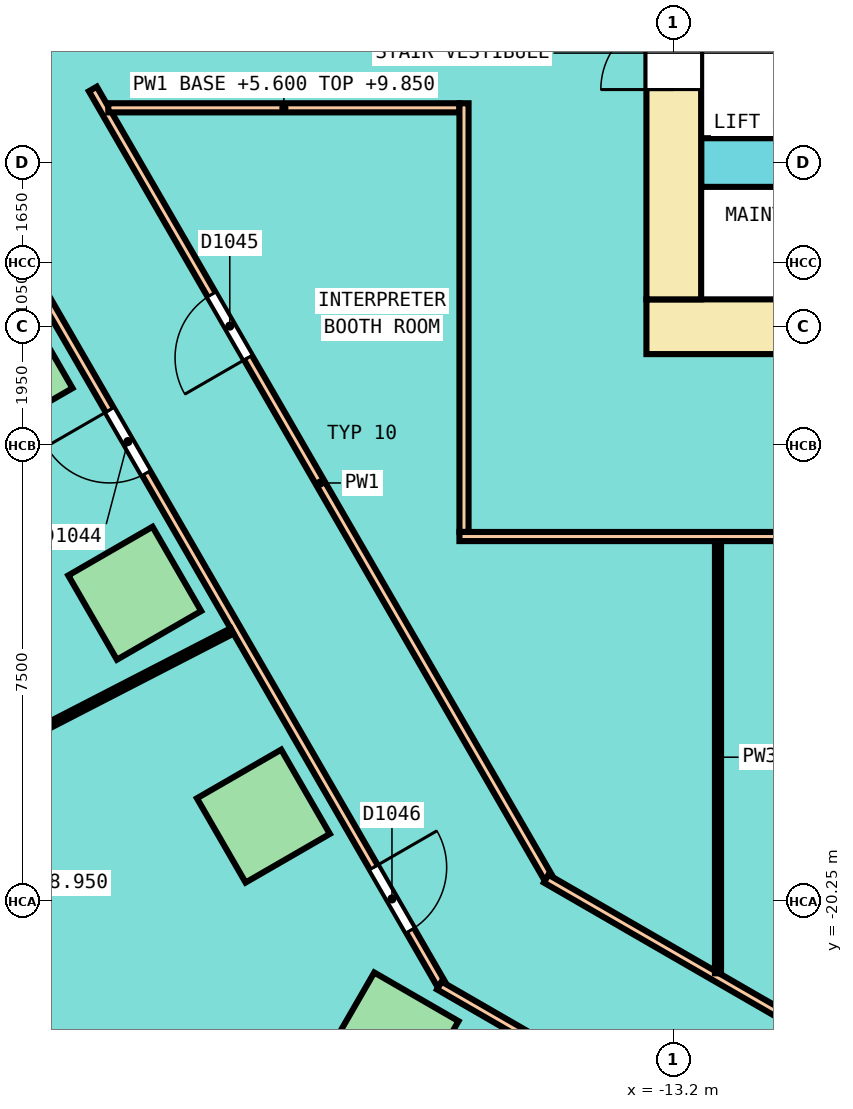
"""IFC4 building model, lengths in metres.
Left out: names, types, materials, properties, quantities, classifications, styles, units other than length and angle.
Written with IfcOpenShell. Run it as: python <this file> out.ifc"""

import sys

from ifc_helpers import new_model, si_unit, direction, frame, frame_2d, origin, origin_2d, place, context, subcontext, project, spatial, rectangle, extrude, element, fill, save


model = new_model("IFC4")
c1 = context("Model", 3, precision=1e-05, world=origin(), true_north=direction((0.0, 1.0)))
c2 = subcontext(c1, "Body", "Model", "MODEL_VIEW")
j1 = project(units=[si_unit("LENGTHUNIT", "METRE"), si_unit("PLANEANGLEUNIT", "RADIAN")], contexts=[c1])
p1 = place(None, origin())
s1 = spatial("IfcSite", under=j1, at=p1, CompositionType="ELEMENT")
p2 = place(p1, origin())
s2 = spatial("IfcBuilding", under=s1, at=p2, CompositionType="ELEMENT")
p3 = place(p2, frame((0.0, 0.0, 5.6)))
s3 = spatial("IfcBuildingStorey", under=s2, at=p3, CompositionType="ELEMENT", Elevation=5.6)
for number, where, z_axis, x_axis in (
    (1, (-24.181, -11.518, 0.0), (0.0, 0.0, 1.0), (0.5, -0.866, 0.0)),
    (2, (-22.065, -15.183, 0.0), (0.0, 0.0, 1.0), (0.5, -0.866, 0.0)),
    (3, (-19.949, -18.847, 0.0), (0.0, 0.0, 1.0), (0.5, -0.866, 0.0)),
    (4, (-17.833, -22.512, 0.0), (0.0, 0.0, 1.0), (0.866, -0.5, 0.0)),
):
    element("IfcColumn", number, at=place(p3, frame(where, z_axis=z_axis, x_axis=x_axis)), inside=s3, PredefinedType="COLUMN", context=c2, shape_type="SweptSolid", body=[
        extrude(rectangle(XDim=1.6, YDim=1.6, at=origin_2d()), origin(), (0.0, 0.0, 1.0), 4.25),
    ])
p4 = place(p3, frame((-13.65, -10.8, 0.0), z_axis=(0.0, 0.0, 1.0), x_axis=(1.0, 0.0, 0.0)))
e5 = element("IfcWall", 5, at=p4, inside=s3, PredefinedType="SHEAR", context=c2, shape_type="SweptSolid", body=[
    extrude(rectangle(XDim=27.3, YDim=0.9, at=frame_2d((13.65, 0.0))), origin(), (0.0, 0.0, 1.0), 4.3),
])
p5 = place(p4, frame((2.425, 0.0, 0.0)))
e6 = element("IfcOpeningElement", 6, at=p5, cuts=e5, PredefinedType="OPENING", context=c2, shape_type="SweptSolid", body=[
    extrude(rectangle(XDim=1.0, YDim=2.1, at=frame_2d((0.5, 1.05))), frame((0.0, 0.46, 0.0), z_axis=(0.0, -1.0, 0.0), x_axis=(1.0, 0.0, 0.0)), (0.0, 0.0, 1.0), 0.92),
])
p6 = place(p4, frame((6.569, 0.0, 0.0)))
e7 = element("IfcOpeningElement", 7, at=p6, cuts=e5, PredefinedType="OPENING", context=c2, shape_type="SweptSolid", body=[
    extrude(rectangle(XDim=1.0, YDim=2.1, at=frame_2d((0.5, 1.05))), frame((0.0, 0.46, 0.0), z_axis=(0.0, -1.0, 0.0), x_axis=(1.0, 0.0, 0.0)), (0.0, 0.0, 1.0), 0.92),
])
p7 = place(p4, frame((10.681, 0.0, 0.0)))
e8 = element("IfcOpeningElement", 8, at=p7, cuts=e5, PredefinedType="OPENING", context=c2, shape_type="SweptSolid", body=[
    extrude(rectangle(XDim=1.0, YDim=2.1, at=frame_2d((0.5, 1.05))), frame((0.0, 0.46, 0.0), z_axis=(0.0, -1.0, 0.0), x_axis=(1.0, 0.0, 0.0)), (0.0, 0.0, 1.0), 0.92),
])
p8 = place(p4, frame((19.202, 0.0, 0.0)))
e9 = element("IfcOpeningElement", 9, at=p8, cuts=e5, PredefinedType="OPENING", context=c2, shape_type="SweptSolid", body=[
    extrude(rectangle(XDim=1.0, YDim=2.1, at=frame_2d((0.5, 1.05))), frame((0.0, 0.46, 0.0), z_axis=(0.0, -1.0, 0.0), x_axis=(1.0, 0.0, 0.0)), (0.0, 0.0, 1.0), 0.92),
])
p9 = place(p4, frame((21.881, 0.0, 0.0)))
e10 = element("IfcOpeningElement", 10, at=p9, cuts=e5, PredefinedType="OPENING", context=c2, shape_type="SweptSolid", body=[
    extrude(rectangle(XDim=1.0, YDim=2.1, at=frame_2d((0.5, 1.05))), frame((0.0, 0.46, 0.0), z_axis=(0.0, -1.0, 0.0), x_axis=(1.0, 0.0, 0.0)), (0.0, 0.0, 1.0), 0.92),
])
p10 = place(p4, frame((24.592, 0.0, 0.0)))
e11 = element("IfcOpeningElement", 11, at=p10, cuts=e5, PredefinedType="OPENING", context=c2, shape_type="SweptSolid", body=[
    extrude(rectangle(XDim=1.0, YDim=2.1, at=frame_2d((0.5, 1.05))), frame((0.0, 0.46, 0.0), z_axis=(0.0, -1.0, 0.0), x_axis=(1.0, 0.0, 0.0)), (0.0, 0.0, 1.0), 0.92),
])
p11 = place(p4, frame((15.2, 0.0, 0.0)))
e12 = element("IfcOpeningElement", 12, at=p11, cuts=e5, PredefinedType="OPENING", context=c2, shape_type="SweptSolid", body=[
    extrude(rectangle(XDim=1.2, YDim=2.1, at=frame_2d((0.6, 1.05))), frame((0.0, 0.46, 0.0), z_axis=(0.0, -1.0, 0.0), x_axis=(1.0, 0.0, 0.0)), (0.0, 0.0, 1.0), 0.92),
])
p12 = place(p3, frame((-13.2, -10.35, 0.0), z_axis=(0.0, 0.0, 1.0), x_axis=(0.0, 1.0, 0.0)))
e13 = element("IfcWall", 13, at=p12, inside=s3, PredefinedType="SHEAR", context=c2, shape_type="SweptSolid", body=[
    extrude(rectangle(XDim=20.7, YDim=0.9, at=frame_2d((10.35, 0.0))), origin(), (0.0, 0.0, 1.0), 4.3),
])
p13 = place(p12, frame((9.15, 0.0, 0.0)))
e14 = element("IfcOpeningElement", 14, at=p13, cuts=e13, PredefinedType="OPENING", context=c2, shape_type="SweptSolid", body=[
    extrude(rectangle(XDim=2.4, YDim=2.1, at=frame_2d((1.2, 1.05))), frame((0.0, 0.46, 0.0), z_axis=(0.0, -1.0, 0.0), x_axis=(1.0, 0.0, 0.0)), (0.0, 0.0, 1.0), 0.92),
])
p14 = place(p12, frame((16.05, 0.0, 0.0)))
e15 = element("IfcOpeningElement", 15, at=p14, cuts=e13, PredefinedType="OPENING", context=c2, shape_type="SweptSolid", body=[
    extrude(rectangle(XDim=1.2, YDim=2.1, at=frame_2d((0.6, 1.05))), frame((0.0, 0.46, 0.0), z_axis=(0.0, -1.0, 0.0), x_axis=(1.0, 0.0, 0.0)), (0.0, 0.0, 1.0), 0.92),
])
p15 = place(p12, frame((3.45, 0.0, 0.0)))
e16 = element("IfcOpeningElement", 16, at=p15, cuts=e13, PredefinedType="OPENING", context=c2, shape_type="SweptSolid", body=[
    extrude(rectangle(XDim=1.2, YDim=2.1, at=frame_2d((0.6, 1.05))), frame((0.0, 0.46, 0.0), z_axis=(0.0, -1.0, 0.0), x_axis=(1.0, 0.0, 0.0)), (0.0, 0.0, 1.0), 0.92),
])
p16 = place(p3, frame((-12.75, -8.1, 0.0), z_axis=(0.0, 0.0, 1.0), x_axis=(1.0, 0.0, 0.0)))
e17 = element("IfcWall", 17, at=p16, inside=s3, PredefinedType="SHEAR", context=c2, shape_type="SweptSolid", body=[
    extrude(rectangle(XDim=25.5, YDim=0.8, at=frame_2d((12.75, 0.0))), origin(), (0.0, 0.0, 1.0), 4.3),
])
p17 = place(p16, frame((14.3, 0.0, 0.0)))
e18 = element("IfcOpeningElement", 18, at=p17, cuts=e17, PredefinedType="OPENING", context=c2, shape_type="SweptSolid", body=[
    extrude(rectangle(XDim=1.2, YDim=2.1, at=frame_2d((0.6, 1.05))), frame((0.0, 0.41, 0.0), z_axis=(0.0, -1.0, 0.0), x_axis=(1.0, 0.0, 0.0)), (0.0, 0.0, 1.0), 0.82),
])
p18 = place(p3, frame((-22.753, -6.89, 0.0), z_axis=(0.0, 0.0, 1.0), x_axis=(0.499997859304, -0.866026639712, 0.0)))
e19 = element("IfcWall", 19, at=p18, inside=s3, PredefinedType="PARTITIONING", context=c2, shape_type="SweptSolid", body=[
    extrude(rectangle(XDim=14.963, YDim=0.15, at=frame_2d((7.482, 0.0))), origin(), (0.0, 0.0, 1.0), 3.2),
])
p19 = place(p18, frame((3.903, 0.0, 0.0)))
e20 = element("IfcOpeningElement", 20, at=p19, cuts=e19, PredefinedType="OPENING", context=c2, shape_type="SweptSolid", body=[
    extrude(rectangle(XDim=1.2, YDim=2.1, at=frame_2d((0.6, 1.05))), frame((0.0, 0.085, 0.0), z_axis=(0.0, -1.0, 0.0), x_axis=(1.0, 0.0, 0.0)), (0.0, 0.0, 1.0), 0.17),
])
p20 = place(p3, frame((-27.3, -3.814, 0.0), z_axis=(0.0, 0.0, 1.0), x_axis=(0.499997805905, -0.866026670542, 0.0)))
e21 = element("IfcWall", 21, at=p20, inside=s3, PredefinedType="PARTITIONING", context=c2, shape_type="SweptSolid", body=[
    extrude(rectangle(XDim=20.543, YDim=0.15, at=frame_2d((10.272, 0.0))), origin(), (0.0, 0.0, 1.0), 3.2),
])
p21 = place(p20, frame((9.647, 0.0, 0.0)))
e22 = element("IfcOpeningElement", 22, at=p21, cuts=e21, PredefinedType="OPENING", context=c2, shape_type="SweptSolid", body=[
    extrude(rectangle(XDim=1.2, YDim=2.1, at=frame_2d((0.6, 1.05))), frame((0.0, 0.085, 0.0), z_axis=(0.0, -1.0, 0.0), x_axis=(1.0, 0.0, 0.0)), (0.0, 0.0, 1.0), 0.17),
])
p22 = place(p20, frame((18.331, 0.0, 0.0)))
e23 = element("IfcOpeningElement", 23, at=p22, cuts=e21, PredefinedType="OPENING", context=c2, shape_type="SweptSolid", body=[
    extrude(rectangle(XDim=1.2, YDim=2.1, at=frame_2d((0.6, 1.05))), frame((0.0, 0.085, 0.0), z_axis=(0.0, -1.0, 0.0), x_axis=(1.0, 0.0, 0.0)), (0.0, 0.0, 1.0), 0.17),
])
p23 = place(p3, frame((-15.299, -19.876, 0.0), z_axis=(0.0, 0.0, 1.0), x_axis=(0.866024786089, -0.500001069878, 0.0)))
e24 = element("IfcWall", 24, at=p23, inside=s3, PredefinedType="PARTITIONING", context=c2, shape_type="SweptSolid", body=[
    extrude(rectangle(XDim=6.473, YDim=0.15, at=frame_2d((3.236, 0.0))), origin(), (0.0, 0.0, 1.0), 3.2),
])
p24 = place(p3, frame((-17.056, -21.633, 0.0), z_axis=(0.0, 0.0, 1.0), x_axis=(0.866023143435, -0.50000391502, 0.0)))
e25 = element("IfcWall", 25, at=p24, inside=s3, PredefinedType="PARTITIONING", context=c2, shape_type="SweptSolid", body=[
    extrude(rectangle(XDim=7.759, YDim=0.15, at=frame_2d((3.879, 0.0))), origin(), (0.0, 0.0, 1.0), 3.2),
])
p25 = place(p24, frame((5.116, 0.0, 0.0)))
e26 = element("IfcOpeningElement", 26, at=p25, cuts=e25, PredefinedType="OPENING", context=c2, shape_type="SweptSolid", body=[
    extrude(rectangle(XDim=1.0, YDim=2.1, at=frame_2d((0.5, 1.05))), frame((0.0, 0.085, 0.0), z_axis=(0.0, -1.0, 0.0), x_axis=(1.0, 0.0, 0.0)), (0.0, 0.0, 1.0), 0.17),
])
p26 = place(p3, frame((-22.5, -7.2, 0.0), z_axis=(0.0, 0.0, 1.0), x_axis=(1.0, 0.0, 0.0)))
e27 = element("IfcWall", 27, at=p26, inside=s3, PredefinedType="PARTITIONING", context=c2, shape_type="SweptSolid", body=[
    extrude(rectangle(XDim=5.774, YDim=0.15, at=frame_2d((2.887, 0.0))), origin(), (0.0, 0.0, 1.0), 4.25),
])
p27 = place(p3, frame((-16.65, -14.175, 0.0), z_axis=(0.0, 0.0, 1.0), x_axis=(0.0, 1.0, 0.0)))
e28 = element("IfcWall", 28, at=p27, inside=s3, PredefinedType="PARTITIONING", context=c2, shape_type="SweptSolid", body=[
    extrude(rectangle(XDim=7.05, YDim=0.15, at=frame_2d((3.525, 0.0))), origin(), (0.0, 0.0, 1.0), 3.2),
])
p28 = place(p3, frame((-16.725, -14.25, 0.0), z_axis=(0.0, 0.0, 1.0), x_axis=(1.0, 0.0, 0.0)))
e29 = element("IfcWall", 29, at=p28, inside=s3, PredefinedType="PARTITIONING", context=c2, shape_type="SweptSolid", body=[
    extrude(rectangle(XDim=23.45, YDim=0.15, at=frame_2d((11.725, 0.0))), origin(), (0.0, 0.0, 1.0), 3.2),
])
p29 = place(p28, frame((9.677, 0.0, 0.0)))
e30 = element("IfcOpeningElement", 30, at=p29, cuts=e29, PredefinedType="OPENING", context=c2, shape_type="SweptSolid", body=[
    extrude(rectangle(XDim=1.0, YDim=2.1, at=frame_2d((0.5, 1.05))), frame((0.0, 0.085, 0.0), z_axis=(0.0, -1.0, 0.0), x_axis=(1.0, 0.0, 0.0)), (0.0, 0.0, 1.0), 0.17),
])
p30 = place(p3, frame((-29.521, -20.469, 0.0), z_axis=(0.0, 0.0, 1.0), x_axis=(0.888930498325, 0.458042104122, 0.0)))
e31 = element("IfcWall", 31, at=p30, inside=s3, PredefinedType="PARTITIONING", context=c2, shape_type="SweptSolid", body=[
    extrude(rectangle(XDim=10.187, YDim=0.1, at=frame_2d((5.093, 0.0))), origin(), (0.0, 0.0, 1.0), 3.35),
])
p31 = place(p3, frame((-12.473, -21.433, 0.0), z_axis=(0.0, 0.0, 1.0), x_axis=(0.0, 1.0, 0.0)))
e32 = element("IfcWall", 32, at=p31, inside=s3, PredefinedType="PARTITIONING", context=c2, shape_type="SweptSolid", body=[
    extrude(rectangle(XDim=7.108, YDim=0.1, at=frame_2d((3.554, 0.0))), origin(), (0.0, 0.0, 1.0), 3.2),
])
p32 = place(p15, origin())
e33 = element("IfcDoor", 33, at=p32, inside=s3, OperationType="SINGLE_SWING_RIGHT", PredefinedType="DOOR", context=c2, shape_type="SweptSolid", body=[
    extrude(rectangle(XDim=1.2, YDim=2.1, at=frame_2d((0.6, 1.05))), frame((0.0, 0.3, 0.0), z_axis=(0.0, -1.0, 0.0), x_axis=(1.0, 0.0, 0.0)), (0.0, 0.0, 1.0), 0.6),
])
fill(e16, e33)
p33 = place(p21, origin())
e34 = element("IfcDoor", 34, at=p33, inside=s3, OperationType="DOUBLE_DOOR_SINGLE_SWING", PredefinedType="DOOR", context=c2, shape_type="SweptSolid", body=[
    extrude(rectangle(XDim=1.2, YDim=2.1, at=frame_2d((0.6, 1.05))), frame((0.0, 0.025, 0.0), z_axis=(0.0, -1.0, 0.0), x_axis=(1.0, 0.0, 0.0)), (0.0, 0.0, 1.0), 0.05),
])
fill(e22, e34)
p34 = place(p19, origin())
e35 = element("IfcDoor", 35, at=p34, inside=s3, OperationType="DOUBLE_DOOR_SINGLE_SWING", PredefinedType="DOOR", context=c2, shape_type="SweptSolid", body=[
    extrude(rectangle(XDim=1.2, YDim=2.1, at=frame_2d((0.6, 1.05))), frame((0.0, 0.025, 0.0), z_axis=(0.0, -1.0, 0.0), x_axis=(1.0, 0.0, 0.0)), (0.0, 0.0, 1.0), 0.05),
])
fill(e20, e35)
p35 = place(p22, origin())
e36 = element("IfcDoor", 36, at=p35, inside=s3, OperationType="DOUBLE_DOOR_SINGLE_SWING", PredefinedType="DOOR", context=c2, shape_type="SweptSolid", body=[
    extrude(rectangle(XDim=1.2, YDim=2.1, at=frame_2d((0.6, 1.05))), frame((0.0, 0.025, 0.0), z_axis=(0.0, -1.0, 0.0), x_axis=(1.0, 0.0, 0.0)), (0.0, 0.0, 1.0), 0.05),
])
fill(e23, e36)
save(model, sys.argv[1])
